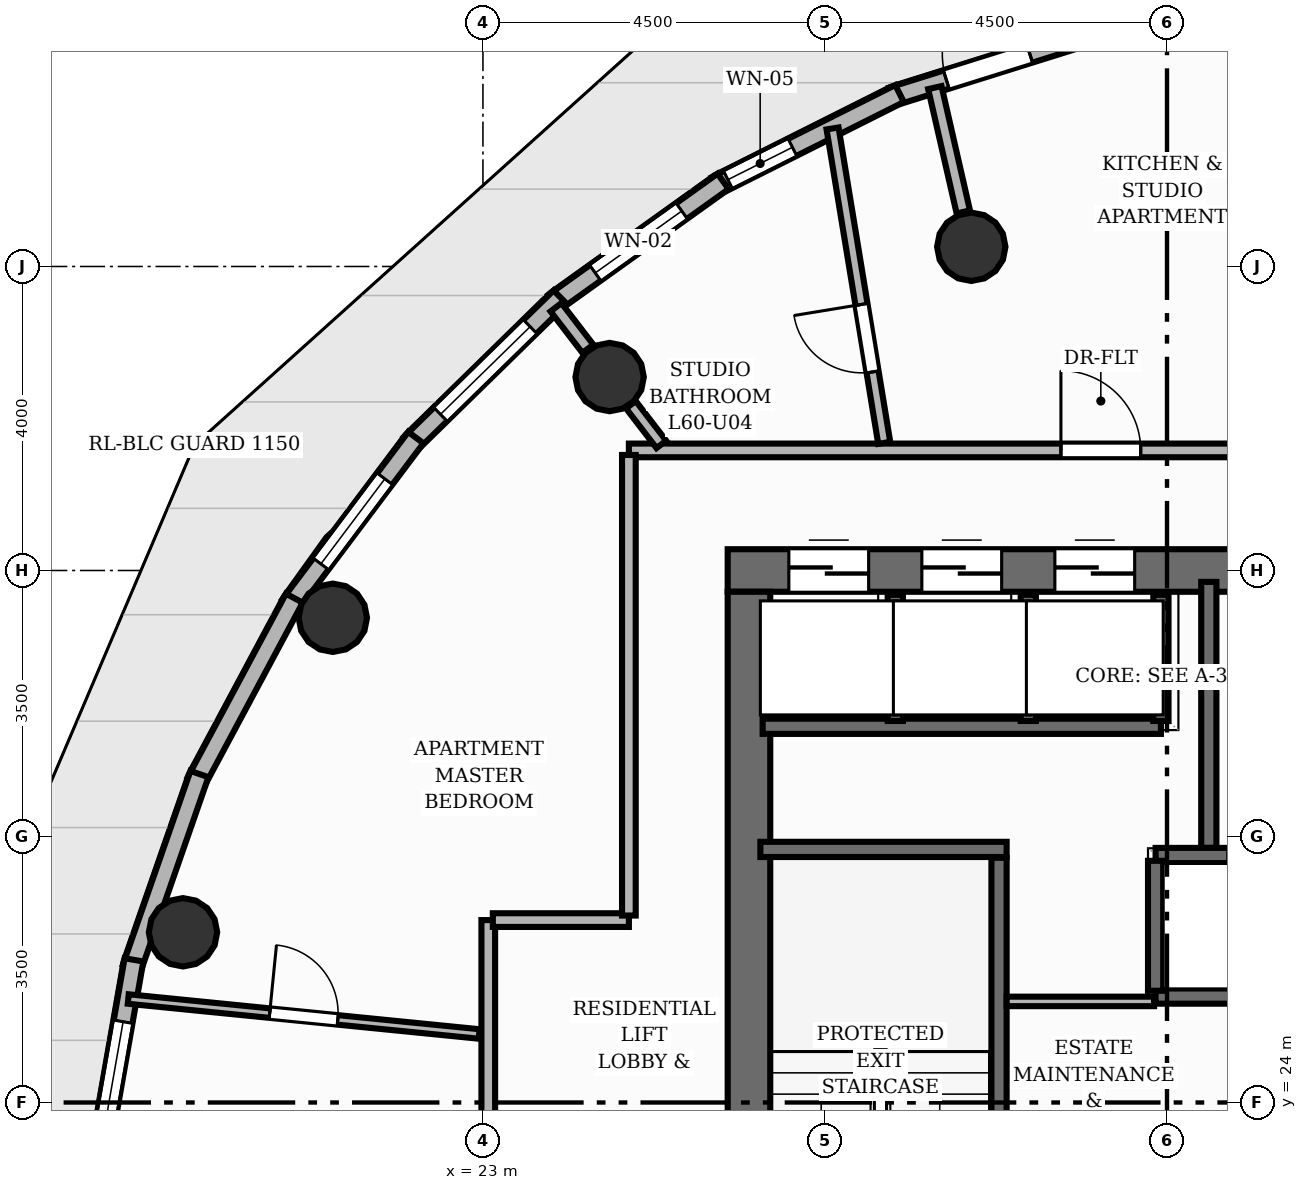
"""IFC4 building model, lengths in metres.
Left out: names, types, materials, properties, quantities, classifications, styles, units other than length and angle.
Written with IfcOpenShell. Run it as: python <this file> out.ifc"""

import sys

from ifc_helpers import new_model, si_unit, direction, frame, frame_2d, origin, origin_2d, place, context, subcontext, project, spatial, rectangle, circle, extrude, element, fill, save


model = new_model("IFC4")
c1 = context("Model", 3, precision=1e-05, world=origin(), true_north=direction((0.0, 1.0)))
c2 = subcontext(c1, "Body", "Model", "MODEL_VIEW")
j1 = project(units=[si_unit("LENGTHUNIT", "METRE"), si_unit("PLANEANGLEUNIT", "RADIAN")], contexts=[c1])
p1 = place(None, origin())
s1 = spatial("IfcSite", under=j1, at=p1, CompositionType="ELEMENT")
p2 = place(p1, origin())
s2 = spatial("IfcBuilding", under=s1, at=p2, CompositionType="ELEMENT")
p3 = place(p2, frame((0.0, 0.0, 201.44)))
s3 = spatial("IfcBuildingStorey", under=s2, at=p3, CompositionType="ELEMENT", Elevation=201.44)
p4 = place(p3, frame((26.22, 31.0, 0.0), z_axis=(0.0, 0.0, 1.0), x_axis=(1.0, 0.0, 0.0)))
e1 = element("IfcWall", 1, at=p4, inside=s3, PredefinedType="SHEAR", context=c2, shape_type="SweptSolid", body=[
    extrude(rectangle(XDim=11.56, YDim=0.56, at=frame_2d((5.78, 0.0))), origin(), (0.0, 0.0, 1.0), 3.2),
])
p5 = place(p4, frame((8.18, 0.0, 0.0)))
e2 = element("IfcOpeningElement", 2, at=p5, cuts=e1, PredefinedType="OPENING", context=c2, shape_type="SweptSolid", body=[
    extrude(rectangle(XDim=1.1, YDim=2.15, at=frame_2d((0.55, 1.075))), frame((0.0, 0.29, 0.0), z_axis=(0.0, -1.0, 0.0), x_axis=(1.0, 0.0, 0.0)), (0.0, 0.0, 1.0), 0.58),
])
p6 = place(p4, frame((0.805, 0.0, 0.0)))
e3 = element("IfcOpeningElement", 3, at=p6, cuts=e1, PredefinedType="OPENING", context=c2, shape_type="SweptSolid", body=[
    extrude(rectangle(XDim=1.05, YDim=2.15, at=frame_2d((0.525, 1.075))), frame((0.0, 0.29, 0.0), z_axis=(0.0, -1.0, 0.0), x_axis=(1.0, 0.0, 0.0)), (0.0, 0.0, 1.0), 0.58),
])
p7 = place(p4, frame((2.555, 0.0, 0.0)))
e4 = element("IfcOpeningElement", 4, at=p7, cuts=e1, PredefinedType="OPENING", context=c2, shape_type="SweptSolid", body=[
    extrude(rectangle(XDim=1.05, YDim=2.15, at=frame_2d((0.525, 1.075))), frame((0.0, 0.29, 0.0), z_axis=(0.0, -1.0, 0.0), x_axis=(1.0, 0.0, 0.0)), (0.0, 0.0, 1.0), 0.58),
])
p8 = place(p4, frame((4.305, 0.0, 0.0)))
e5 = element("IfcOpeningElement", 5, at=p8, cuts=e1, PredefinedType="OPENING", context=c2, shape_type="SweptSolid", body=[
    extrude(rectangle(XDim=1.05, YDim=2.15, at=frame_2d((0.525, 1.075))), frame((0.0, 0.29, 0.0), z_axis=(0.0, -1.0, 0.0), x_axis=(1.0, 0.0, 0.0)), (0.0, 0.0, 1.0), 0.58),
])
p9 = place(p3, frame((26.5, 17.28, 0.0), z_axis=(0.0, 0.0, 1.0), x_axis=(0.0, 1.0, 0.0)))
e6 = element("IfcWall", 6, at=p9, inside=s3, PredefinedType="SHEAR", context=c2, shape_type="SweptSolid", body=[
    extrude(rectangle(XDim=13.44, YDim=0.56, at=frame_2d((6.72, 0.0))), origin(), (0.0, 0.0, 1.0), 3.2),
])
for number, where, z_axis, x_axis in (
    (7, (29.425, 35.26, 0.0), (0.0, 0.0, 1.0), (1.0, 0.0, 0.0)),
    (8, (24.667, 33.545, 0.0), (0.0, 0.0, 1.0), (1.0, 0.0, 0.0)),
    (9, (21.025, 30.378, 0.0), (0.0, 0.0, 1.0), (1.0, 0.0, 0.0)),
    (10, (19.054, 26.24, 0.0), (0.0, 0.0, 1.0), (1.0, 0.0, 0.0)),
):
    element("IfcColumn", number, at=place(p3, frame(where, z_axis=z_axis, x_axis=x_axis)), inside=s3, PredefinedType="COLUMN", context=c2, shape_type="SweptSolid", body=[
        extrude(circle(Radius=0.45, at=origin_2d()), origin(), (0.0, 0.0, 1.0), 3.2),
    ])
p10 = place(p3, frame((28.379, 37.234, 0.0), z_axis=(0.0, 0.0, 1.0), x_axis=(0.954307768746, 0.298825505122, 0.0)))
e11 = element("IfcWall", 11, at=p10, inside=s3, PredefinedType="SOLIDWALL", context=c2, shape_type="SweptSolid", body=[
    extrude(rectangle(XDim=2.651, YDim=0.25, at=frame_2d((1.326, 0.0))), origin(), (0.0, 0.0, 1.0), 2.96),
])
p11 = place(p10, frame((0.751, 0.0, 0.0)))
e12 = element("IfcOpeningElement", 12, at=p11, cuts=e11, PredefinedType="OPENING", context=c2, shape_type="SweptSolid", body=[
    extrude(rectangle(XDim=1.15, YDim=2.2, at=frame_2d((0.575, 1.1))), frame((0.0, 0.135, 0.0), z_axis=(0.0, -1.0, 0.0), x_axis=(1.0, 0.0, 0.0)), (0.0, 0.0, 1.0), 0.27),
])
p12 = place(p3, frame((26.066, 36.063, 0.0), z_axis=(0.0, 0.0, 1.0), x_axis=(0.893757522153, 0.448550433724, 0.0)))
e13 = element("IfcWall", 13, at=p12, inside=s3, PredefinedType="SOLIDWALL", context=c2, shape_type="SweptSolid", body=[
    extrude(rectangle(XDim=2.702, YDim=0.25, at=frame_2d((1.351, 0.0))), origin(), (0.0, 0.0, 1.0), 2.96),
])
p13 = place(p12, frame((0.175, 0.0, 0.85)))
e14 = element("IfcOpeningElement", 14, at=p13, cuts=e13, PredefinedType="OPENING", context=c2, shape_type="SweptSolid", body=[
    extrude(rectangle(XDim=0.95, YDim=1.45, at=frame_2d((0.475, 0.725))), frame((0.0, 0.135, 0.0), z_axis=(0.0, -1.0, 0.0), x_axis=(1.0, 0.0, 0.0)), (0.0, 0.0, 1.0), 0.27),
])
p14 = place(p3, frame((23.934, 34.526, 0.0), z_axis=(0.0, 0.0, 1.0), x_axis=(0.812997900305, 0.58226661771, 0.0)))
e15 = element("IfcWall", 15, at=p14, inside=s3, PredefinedType="SOLIDWALL", context=c2, shape_type="SweptSolid", body=[
    extrude(rectangle(XDim=2.739, YDim=0.25, at=frame_2d((1.369, 0.0))), origin(), (0.0, 0.0, 1.0), 2.96),
])
p15 = place(p14, frame((0.669, 0.0, 0.85)))
e16 = element("IfcOpeningElement", 16, at=p15, cuts=e15, PredefinedType="OPENING", context=c2, shape_type="SweptSolid", body=[
    extrude(rectangle(XDim=1.4, YDim=1.55, at=frame_2d((0.7, 0.775))), frame((0.0, 0.135, 0.0), z_axis=(0.0, -1.0, 0.0), x_axis=(1.0, 0.0, 0.0)), (0.0, 0.0, 1.0), 0.27),
])
p16 = place(p3, frame((22.045, 32.667, 0.0), z_axis=(0.0, 0.0, 1.0), x_axis=(0.71485422762, 0.699273503898, 0.0)))
e17 = element("IfcWall", 17, at=p16, inside=s3, PredefinedType="SOLIDWALL", context=c2, shape_type="SweptSolid", body=[
    extrude(rectangle(XDim=2.758, YDim=0.25, at=frame_2d((1.379, 0.0))), origin(), (0.0, 0.0, 1.0), 2.96),
])
p17 = place(p16, frame((0.554, 0.0, 0.85)))
e18 = element("IfcOpeningElement", 18, at=p17, cuts=e17, PredefinedType="OPENING", context=c2, shape_type="SweptSolid", body=[
    extrude(rectangle(XDim=1.65, YDim=1.55, at=frame_2d((0.825, 0.775))), frame((0.0, 0.135, 0.0), z_axis=(0.0, -1.0, 0.0), x_axis=(1.0, 0.0, 0.0)), (0.0, 0.0, 1.0), 0.27),
])
p18 = place(p3, frame((20.46, 30.544, 0.0), z_axis=(0.0, 0.0, 1.0), x_axis=(0.600877762795, 0.799340924874, 0.0)))
e19 = element("IfcWall", 19, at=p18, inside=s3, PredefinedType="SOLIDWALL", context=c2, shape_type="SweptSolid", body=[
    extrude(rectangle(XDim=2.758, YDim=0.25, at=frame_2d((1.379, 0.0))), origin(), (0.0, 0.0, 1.0), 2.96),
])
p19 = place(p18, frame((0.679, 0.0, 0.85)))
e20 = element("IfcOpeningElement", 20, at=p19, cuts=e19, PredefinedType="OPENING", context=c2, shape_type="SweptSolid", body=[
    extrude(rectangle(XDim=1.4, YDim=1.55, at=frame_2d((0.7, 0.775))), frame((0.0, 0.135, 0.0), z_axis=(0.0, -1.0, 0.0), x_axis=(1.0, 0.0, 0.0)), (0.0, 0.0, 1.0), 0.27),
])
p20 = place(p3, frame((19.226, 28.221, 0.0), z_axis=(0.0, 0.0, 1.0), x_axis=(0.472035862223, 0.88157934684, 0.0)))
e21 = element("IfcWall", 21, at=p20, inside=s3, PredefinedType="SOLIDWALL", context=c2, shape_type="SweptSolid", body=[
    extrude(rectangle(XDim=2.739, YDim=0.25, at=frame_2d((1.369, 0.0))), origin(), (0.0, 0.0, 1.0), 2.96),
])
p21 = place(p3, frame((18.381, 25.77, 0.0), z_axis=(0.0, 0.0, 1.0), x_axis=(0.329021781096, 0.94432233245, 0.0)))
e22 = element("IfcWall", 22, at=p21, inside=s3, PredefinedType="SOLIDWALL", context=c2, shape_type="SweptSolid", body=[
    extrude(rectangle(XDim=2.702, YDim=0.25, at=frame_2d((1.351, 0.0))), origin(), (0.0, 0.0, 1.0), 2.96),
])
p22 = place(p3, frame((17.95, 23.265, 0.0), z_axis=(0.0, 0.0, 1.0), x_axis=(0.172755592744, 0.984964722808, 0.0)))
e23 = element("IfcWall", 23, at=p22, inside=s3, PredefinedType="SOLIDWALL", context=c2, shape_type="SweptSolid", body=[
    extrude(rectangle(XDim=2.651, YDim=0.25, at=frame_2d((1.326, 0.0))), origin(), (0.0, 0.0, 1.0), 2.96),
])
p23 = place(p22, frame((0.175, 0.0, 0.85)))
e24 = element("IfcOpeningElement", 24, at=p23, cuts=e23, PredefinedType="OPENING", context=c2, shape_type="SweptSolid", body=[
    extrude(rectangle(XDim=1.65, YDim=1.55, at=frame_2d((0.825, 0.775))), frame((0.0, 0.135, 0.0), z_axis=(0.0, -1.0, 0.0), x_axis=(1.0, 0.0, 0.0)), (0.0, 0.0, 1.0), 0.27),
])
p24 = place(p3, frame((29.79, 20.78, 0.0), z_axis=(0.0, 0.0, 1.0), x_axis=(0.0, 1.0, 0.0)))
e25 = element("IfcWall", 25, at=p24, inside=s3, PredefinedType="SHEAR", context=c2, shape_type="SweptSolid", body=[
    extrude(rectangle(XDim=6.44, YDim=0.2, at=frame_2d((3.22, 0.0))), origin(), (0.0, 0.0, 1.0), 3.2),
])
p25 = place(p3, frame((26.65, 27.33, 0.0), z_axis=(0.0, 0.0, 1.0), x_axis=(1.0, 0.0, 0.0)))
e26 = element("IfcWall", 26, at=p25, inside=s3, PredefinedType="SHEAR", context=c2, shape_type="SweptSolid", body=[
    extrude(rectangle(XDim=3.24, YDim=0.2, at=frame_2d((1.62, 0.0))), origin(), (0.0, 0.0, 1.0), 3.2),
])
p26 = place(p3, frame((32.55, 27.35, 0.0), z_axis=(0.0, 0.0, 1.0), x_axis=(0.0, 1.0, 0.0)))
e27 = element("IfcWall", 27, at=p26, inside=s3, PredefinedType="SHEAR", context=c2, shape_type="SweptSolid", body=[
    extrude(rectangle(XDim=3.5, YDim=0.2, at=frame_2d((1.75, 0.0))), origin(), (0.0, 0.0, 1.0), 3.2),
])
p27 = place(p3, frame((31.85, 27.25, 0.0), z_axis=(0.0, 0.0, 1.0), x_axis=(1.0, 0.0, 0.0)))
e28 = element("IfcWall", 28, at=p27, inside=s3, PredefinedType="SHEAR", context=c2, shape_type="SweptSolid", body=[
    extrude(rectangle(XDim=2.3, YDim=0.2, at=frame_2d((1.15, 0.0))), origin(), (0.0, 0.0, 1.0), 3.2),
])
p28 = place(p27, frame((0.95, 0.0, 0.0)))
e29 = element("IfcOpeningElement", 29, at=p28, cuts=e28, PredefinedType="OPENING", context=c2, shape_type="SweptSolid", body=[
    extrude(rectangle(XDim=1.1, YDim=2.15, at=frame_2d((0.55, 1.075))), frame((0.0, 0.11, 0.0), z_axis=(0.0, -1.0, 0.0), x_axis=(1.0, 0.0, 0.0)), (0.0, 0.0, 1.0), 0.22),
])
p29 = place(p3, frame((31.85, 25.4, 0.0), z_axis=(0.0, 0.0, 1.0), x_axis=(1.0, 0.0, 0.0)))
e30 = element("IfcWall", 30, at=p29, inside=s3, PredefinedType="SHEAR", context=c2, shape_type="SweptSolid", body=[
    extrude(rectangle(XDim=2.3, YDim=0.2, at=frame_2d((1.15, 0.0))), origin(), (0.0, 0.0, 1.0), 3.2),
])
p30 = place(p3, frame((31.85, 25.47, 0.0), z_axis=(0.0, 0.0, 1.0), x_axis=(0.0, 1.0, 0.0)))
e31 = element("IfcWall", 31, at=p30, inside=s3, PredefinedType="SHEAR", context=c2, shape_type="SweptSolid", body=[
    extrude(rectangle(XDim=1.71, YDim=0.2, at=frame_2d((0.855, 0.0))), origin(), (0.0, 0.0, 1.0), 3.2),
])
p31 = place(p3, frame((26.68, 28.95, 0.0), z_axis=(0.0, 0.0, 1.0), x_axis=(1.0, 0.0, 0.0)))
e32 = element("IfcWall", 32, at=p31, inside=s3, PredefinedType="SHEAR", context=c2, shape_type="SweptSolid", body=[
    extrude(rectangle(XDim=5.24, YDim=0.2, at=frame_2d((2.62, 0.0))), origin(), (0.0, 0.0, 1.0), 3.2),
])
for number, where, z_axis, x_axis in (
    (33, (31.92, 29.02, 0.0), (0.0, 0.0, 1.0), (0.0, 1.0, 0.0)),
    (34, (28.425, 29.02, 0.0), (0.0, 0.0, 1.0), (0.0, 1.0, 0.0)),
    (35, (30.175, 29.02, 0.0), (0.0, 0.0, 1.0), (0.0, 1.0, 0.0)),
):
    element("IfcWall", number, at=place(p3, frame(where, z_axis=z_axis, x_axis=x_axis)), inside=s3, PredefinedType="SHEAR", context=c2, shape_type="SweptSolid", body=[
        extrude(rectangle(XDim=1.66, YDim=0.2, at=frame_2d((0.83, 0.0))), origin(), (0.0, 0.0, 1.0), 3.2),
    ])
p32 = place(p3, frame((29.89, 25.33, 0.0), z_axis=(0.0, 0.0, 1.0), x_axis=(1.0, 0.0, 0.0)))
e36 = element("IfcWall", 36, at=p32, inside=s3, PredefinedType="PARTITIONING", context=c2, shape_type="SweptSolid", body=[
    extrude(rectangle(XDim=1.94, YDim=0.125, at=frame_2d((0.97, 0.0))), origin(), (0.0, 0.0, 1.0), 2.955),
])
p33 = place(p3, frame((29.32, 35.718, 0.0), z_axis=(0.0, 0.0, 1.0), x_axis=(-0.222978827263, 0.97482328788, 0.0)))
e37 = element("IfcWall", 37, at=p33, inside=s3, PredefinedType="PARTITIONING", context=c2, shape_type="SweptSolid", body=[
    extrude(rectangle(XDim=1.678, YDim=0.18, at=frame_2d((0.839, 0.0))), origin(), (0.0, 0.0, 1.0), 2.404),
])
p34 = place(p3, frame((24.38, 33.918, 0.0), z_axis=(0.0, 0.0, 1.0), x_axis=(-0.60904199592, 0.793137974885, 0.0)))
e38 = element("IfcWall", 38, at=p34, inside=s3, PredefinedType="PARTITIONING", context=c2, shape_type="SweptSolid", body=[
    extrude(rectangle(XDim=0.688, YDim=0.18, at=frame_2d((0.344, 0.0))), origin(), (0.0, 0.0, 1.0), 2.404),
])
p35 = place(p3, frame((24.92, 32.58, 0.0), z_axis=(0.0, 0.0, 1.0), x_axis=(1.0, 0.0, 0.0)))
e39 = element("IfcWall", 39, at=p35, inside=s3, PredefinedType="PARTITIONING", context=c2, shape_type="SweptSolid", body=[
    extrude(rectangle(XDim=14.16, YDim=0.18, at=frame_2d((7.08, 0.0))), origin(), (0.0, 0.0, 1.0), 2.955),
])
p36 = place(p35, frame((11.563, 0.0, 0.0)))
e40 = element("IfcOpeningElement", 40, at=p36, cuts=e39, PredefinedType="OPENING", context=c2, shape_type="SweptSolid", body=[
    extrude(rectangle(XDim=1.05, YDim=2.15, at=frame_2d((0.525, 1.075))), frame((0.0, 0.1, 0.0), z_axis=(0.0, -1.0, 0.0), x_axis=(1.0, 0.0, 0.0)), (0.0, 0.0, 1.0), 0.2),
])
p37 = place(p35, frame((5.684, 0.0, 0.0)))
e41 = element("IfcOpeningElement", 41, at=p37, cuts=e39, PredefinedType="OPENING", context=c2, shape_type="SweptSolid", body=[
    extrude(rectangle(XDim=1.05, YDim=2.15, at=frame_2d((0.525, 1.075))), frame((0.0, 0.1, 0.0), z_axis=(0.0, -1.0, 0.0), x_axis=(1.0, 0.0, 0.0)), (0.0, 0.0, 1.0), 0.2),
])
p38 = place(p3, frame((23.07, 21.66, 0.0), z_axis=(0.0, 0.0, 1.0), x_axis=(0.0, 1.0, 0.0)))
e42 = element("IfcWall", 42, at=p38, inside=s3, PredefinedType="PARTITIONING", context=c2, shape_type="SweptSolid", body=[
    extrude(rectangle(XDim=4.74, YDim=0.18, at=frame_2d((2.37, 0.0))), origin(), (0.0, 0.0, 1.0), 2.955),
])
p39 = place(p38, frame((1.1, 0.0, 0.0)))
e43 = element("IfcOpeningElement", 43, at=p39, cuts=e42, PredefinedType="OPENING", context=c2, shape_type="SweptSolid", body=[
    extrude(rectangle(XDim=1.05, YDim=2.15, at=frame_2d((0.525, 1.075))), frame((0.0, 0.1, 0.0), z_axis=(0.0, -1.0, 0.0), x_axis=(1.0, 0.0, 0.0)), (0.0, 0.0, 1.0), 0.2),
])
p40 = place(p3, frame((23.13, 26.4, 0.0), z_axis=(0.0, 0.0, 1.0), x_axis=(1.0, 0.0, 0.0)))
e44 = element("IfcWall", 44, at=p40, inside=s3, PredefinedType="PARTITIONING", context=c2, shape_type="SweptSolid", body=[
    extrude(rectangle(XDim=1.79, YDim=0.18, at=frame_2d((0.895, 0.0))), origin(), (0.0, 0.0, 1.0), 2.692),
])
p41 = place(p3, frame((24.92, 26.46, 0.0), z_axis=(0.0, 0.0, 1.0), x_axis=(0.0, 1.0, 0.0)))
e45 = element("IfcWall", 45, at=p41, inside=s3, PredefinedType="PARTITIONING", context=c2, shape_type="SweptSolid", body=[
    extrude(rectangle(XDim=6.06, YDim=0.18, at=frame_2d((3.03, 0.0))), origin(), (0.0, 0.0, 1.0), 2.955),
])
p42 = place(p3, frame((28.28, 32.679, 0.0), z_axis=(0.0, 0.0, 1.0), x_axis=(-0.162160778545, 0.986764349732, 0.0)))
e46 = element("IfcWall", 46, at=p42, inside=s3, PredefinedType="PLUMBINGWALL", context=c2, shape_type="SweptSolid", body=[
    extrude(rectangle(XDim=4.193, YDim=0.16, at=frame_2d((2.096, 0.0))), origin(), (0.0, 0.0, 1.0), 2.692),
])
p43 = place(p42, frame((0.947, 0.0, 0.0)))
e47 = element("IfcOpeningElement", 47, at=p43, cuts=e46, PredefinedType="OPENING", context=c2, shape_type="SweptSolid", body=[
    extrude(rectangle(XDim=0.9, YDim=2.1, at=frame_2d((0.45, 1.05))), frame((0.0, 0.09, 0.0), z_axis=(0.0, -1.0, 0.0), x_axis=(1.0, 0.0, 0.0)), (0.0, 0.0, 1.0), 0.18),
])
p44 = place(p3, frame((25.347, 32.659, 0.0), z_axis=(0.0, 0.0, 1.0), x_axis=(-0.609101063055, 0.79309261438, 0.0)))
e48 = element("IfcWall", 48, at=p44, inside=s3, PredefinedType="PLUMBINGWALL", context=c2, shape_type="SweptSolid", body=[
    extrude(rectangle(XDim=0.658, YDim=0.16, at=frame_2d((0.329, 0.0))), origin(), (0.0, 0.0, 1.0), 2.404),
])
p45 = place(p3, frame((18.333, 25.362, 0.0), z_axis=(0.0, 0.0, 1.0), x_axis=(0.995074627982, -0.09912862728, 0.0)))
e49 = element("IfcWall", 49, at=p45, inside=s3, PredefinedType="PARTITIONING", context=c2, shape_type="SweptSolid", body=[
    extrude(rectangle(XDim=4.64, YDim=0.125, at=frame_2d((2.32, 0.0))), origin(), (0.0, 0.0, 1.0), 2.955),
])
p46 = place(p45, frame((1.87, 0.0, 0.0)))
e50 = element("IfcOpeningElement", 50, at=p46, cuts=e49, PredefinedType="OPENING", context=c2, shape_type="SweptSolid", body=[
    extrude(rectangle(XDim=0.9, YDim=2.1, at=frame_2d((0.45, 1.05))), frame((0.0, 0.073, 0.0), z_axis=(0.0, -1.0, 0.0), x_axis=(1.0, 0.0, 0.0)), (0.0, 0.0, 1.0), 0.145),
])
p47 = place(p11, origin())
e51 = element("IfcDoor", 51, at=p47, inside=s3, OperationType="SINGLE_SWING_RIGHT", PredefinedType="DOOR", context=c2, shape_type="SweptSolid", body=[
    extrude(rectangle(XDim=1.15, YDim=2.2, at=frame_2d((0.575, 1.1))), frame((0.0, 0.025, 0.0), z_axis=(0.0, -1.0, 0.0), x_axis=(1.0, 0.0, 0.0)), (0.0, 0.0, 1.0), 0.05),
])
fill(e12, e51)
p48 = place(p13, origin())
e52 = element("IfcWindow", 52, at=p48, inside=s3, PartitioningType="SINGLE_PANEL", PredefinedType="WINDOW", context=c2, shape_type="SweptSolid", body=[
    extrude(rectangle(XDim=0.95, YDim=1.45, at=frame_2d((0.475, 0.725))), frame((0.0, 0.03, 0.0), z_axis=(0.0, -1.0, 0.0), x_axis=(1.0, 0.0, 0.0)), (0.0, 0.0, 1.0), 0.06),
])
fill(e14, e52)
p49 = place(p15, origin())
e53 = element("IfcWindow", 53, at=p49, inside=s3, PartitioningType="SINGLE_PANEL", PredefinedType="WINDOW", context=c2, shape_type="SweptSolid", body=[
    extrude(rectangle(XDim=1.4, YDim=1.55, at=frame_2d((0.7, 0.775))), frame((0.0, 0.03, 0.0), z_axis=(0.0, -1.0, 0.0), x_axis=(1.0, 0.0, 0.0)), (0.0, 0.0, 1.0), 0.06),
])
fill(e16, e53)
p50 = place(p17, origin())
e54 = element("IfcWindow", 54, at=p50, inside=s3, PartitioningType="SINGLE_PANEL", PredefinedType="WINDOW", context=c2, shape_type="SweptSolid", body=[
    extrude(rectangle(XDim=1.65, YDim=1.55, at=frame_2d((0.825, 0.775))), frame((0.0, 0.03, 0.0), z_axis=(0.0, -1.0, 0.0), x_axis=(1.0, 0.0, 0.0)), (0.0, 0.0, 1.0), 0.06),
])
fill(e18, e54)
p51 = place(p19, origin())
e55 = element("IfcWindow", 55, at=p51, inside=s3, PartitioningType="SINGLE_PANEL", PredefinedType="WINDOW", context=c2, shape_type="SweptSolid", body=[
    extrude(rectangle(XDim=1.4, YDim=1.55, at=frame_2d((0.7, 0.775))), frame((0.0, 0.03, 0.0), z_axis=(0.0, -1.0, 0.0), x_axis=(1.0, 0.0, 0.0)), (0.0, 0.0, 1.0), 0.06),
])
fill(e20, e55)
p52 = place(p23, origin())
e56 = element("IfcWindow", 56, at=p52, inside=s3, PartitioningType="SINGLE_PANEL", PredefinedType="WINDOW", context=c2, shape_type="SweptSolid", body=[
    extrude(rectangle(XDim=1.65, YDim=1.55, at=frame_2d((0.825, 0.775))), frame((0.0, 0.03, 0.0), z_axis=(0.0, -1.0, 0.0), x_axis=(1.0, 0.0, 0.0)), (0.0, 0.0, 1.0), 0.06),
])
fill(e24, e56)
p53 = place(p6, origin())
e57 = element("IfcDoor", 57, at=p53, inside=s3, OperationType="DOUBLE_DOOR_SLIDING", PredefinedType="DOOR", context=c2, shape_type="SweptSolid", body=[
    extrude(rectangle(XDim=1.05, YDim=2.15, at=frame_2d((0.525, 1.075))), frame((0.0, 0.025, 0.0), z_axis=(0.0, -1.0, 0.0), x_axis=(1.0, 0.0, 0.0)), (0.0, 0.0, 1.0), 0.05),
])
fill(e3, e57)
p54 = place(p7, origin())
e58 = element("IfcDoor", 58, at=p54, inside=s3, OperationType="DOUBLE_DOOR_SLIDING", PredefinedType="DOOR", context=c2, shape_type="SweptSolid", body=[
    extrude(rectangle(XDim=1.05, YDim=2.15, at=frame_2d((0.525, 1.075))), frame((0.0, 0.025, 0.0), z_axis=(0.0, -1.0, 0.0), x_axis=(1.0, 0.0, 0.0)), (0.0, 0.0, 1.0), 0.05),
])
fill(e4, e58)
p55 = place(p8, origin())
e59 = element("IfcDoor", 59, at=p55, inside=s3, OperationType="DOUBLE_DOOR_SLIDING", PredefinedType="DOOR", context=c2, shape_type="SweptSolid", body=[
    extrude(rectangle(XDim=1.05, YDim=2.15, at=frame_2d((0.525, 1.075))), frame((0.0, 0.025, 0.0), z_axis=(0.0, -1.0, 0.0), x_axis=(1.0, 0.0, 0.0)), (0.0, 0.0, 1.0), 0.05),
])
fill(e5, e59)
p56 = place(p37, origin())
e60 = element("IfcDoor", 60, at=p56, inside=s3, OperationType="SINGLE_SWING_LEFT", PredefinedType="DOOR", context=c2, shape_type="SweptSolid", body=[
    extrude(rectangle(XDim=1.05, YDim=2.15, at=frame_2d((0.525, 1.075))), frame((0.0, 0.025, 0.0), z_axis=(0.0, -1.0, 0.0), x_axis=(1.0, 0.0, 0.0)), (0.0, 0.0, 1.0), 0.05),
])
fill(e41, e60)
p57 = place(p43, origin())
e61 = element("IfcDoor", 61, at=p57, inside=s3, OperationType="SINGLE_SWING_RIGHT", PredefinedType="DOOR", context=c2, shape_type="SweptSolid", body=[
    extrude(rectangle(XDim=0.9, YDim=2.1, at=frame_2d((0.45, 1.05))), frame((0.0, 0.025, 0.0), z_axis=(0.0, -1.0, 0.0), x_axis=(1.0, 0.0, 0.0)), (0.0, 0.0, 1.0), 0.05),
])
fill(e47, e61)
p58 = place(p46, origin())
e62 = element("IfcDoor", 62, at=p58, inside=s3, OperationType="SINGLE_SWING_LEFT", PredefinedType="DOOR", context=c2, shape_type="SweptSolid", body=[
    extrude(rectangle(XDim=0.9, YDim=2.1, at=frame_2d((0.45, 1.05))), frame((0.0, 0.025, 0.0), z_axis=(0.0, -1.0, 0.0), x_axis=(1.0, 0.0, 0.0)), (0.0, 0.0, 1.0), 0.05),
])
fill(e50, e62)
save(model, sys.argv[1])
